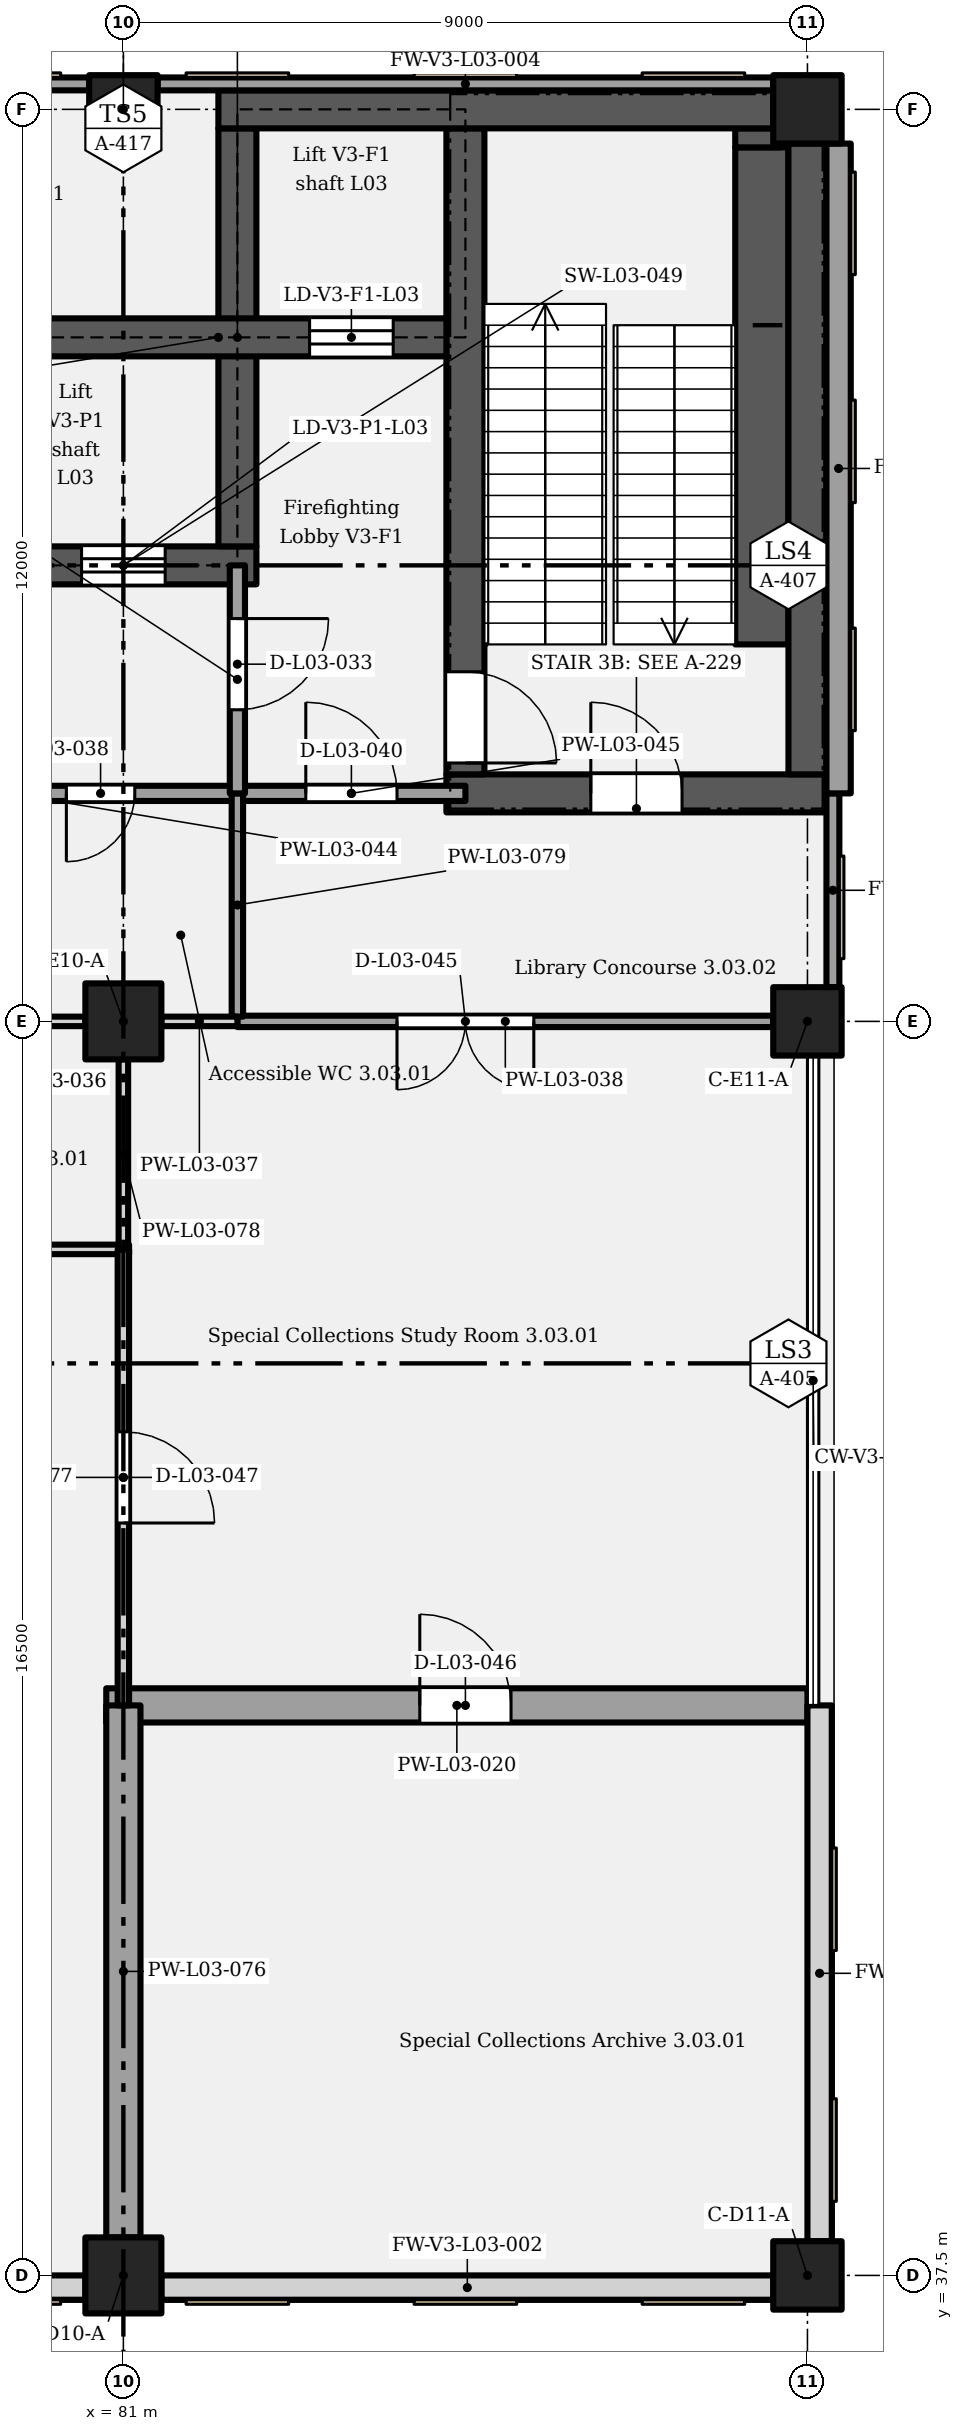
"""IFC4 building model, lengths in metres.
Left out: names, types, materials, properties, quantities, classifications, styles, units other than length and angle.
Written with IfcOpenShell. Run it as: python <this file> out.ifc"""

import sys

from ifc_helpers import new_model, si_unit, direction, frame, frame_2d, origin, origin_2d, place, context, subcontext, project, spatial, rectangle, extrude, element, fill, save


model = new_model("IFC4")
c1 = context("Model", 3, precision=1e-05, world=origin(), true_north=direction((0.0, 1.0)))
c2 = subcontext(c1, "Body", "Model", "MODEL_VIEW")
j1 = project(units=[si_unit("LENGTHUNIT", "METRE"), si_unit("PLANEANGLEUNIT", "RADIAN")], contexts=[c1])
p1 = place(None, origin())
s1 = spatial("IfcSite", under=j1, at=p1, CompositionType="ELEMENT")
p2 = place(p1, origin())
s2 = spatial("IfcBuilding", under=s1, at=p2, CompositionType="ELEMENT")
p3 = place(p2, frame((0.0, 0.0, 17.4)))
s3 = spatial("IfcBuildingStorey", under=s2, at=p3, CompositionType="ELEMENT", Elevation=17.4)
p4 = place(p3, frame((81.0, 37.5, 0.0), z_axis=(0.0, 0.0, 1.0), x_axis=(1.0, 0.0, 0.0)))
e1 = element("IfcColumn", 1, at=p4, inside=s3, PredefinedType="COLUMN", context=c2, shape_type="SweptSolid", body=[
    extrude(rectangle(XDim=1.0, YDim=1.0, at=origin_2d()), origin(), (0.0, 0.0, 1.0), 5.4),
])
p5 = place(p3, frame((90.0, 37.5, 0.0), z_axis=(0.0, 0.0, 1.0), x_axis=(1.0, 0.0, 0.0)))
e2 = element("IfcColumn", 2, at=p5, inside=s3, PredefinedType="COLUMN", context=c2, shape_type="SweptSolid", body=[
    extrude(rectangle(XDim=0.9, YDim=0.9, at=origin_2d()), origin(), (0.0, 0.0, 1.0), 5.4),
])
p6 = place(p3, frame((81.0, 54.0, 0.0), z_axis=(0.0, 0.0, 1.0), x_axis=(1.0, 0.0, 0.0)))
e3 = element("IfcColumn", 3, at=p6, inside=s3, PredefinedType="COLUMN", context=c2, shape_type="SweptSolid", body=[
    extrude(rectangle(XDim=1.0, YDim=1.0, at=origin_2d()), origin(), (0.0, 0.0, 1.0), 5.4),
])
for number, where, z_axis, x_axis in (
    (4, (90.0, 54.0, 0.0), (0.0, 0.0, 1.0), (1.0, 0.0, 0.0)),
    (5, (81.0, 66.0, 0.0), (0.0, 0.0, 1.0), (1.0, 0.0, 0.0)),
    (6, (90.0, 66.0, 0.0), (0.0, 0.0, 1.0), (1.0, 0.0, 0.0)),
):
    element("IfcColumn", number, at=place(p3, frame(where, z_axis=z_axis, x_axis=x_axis)), inside=s3, PredefinedType="COLUMN", context=c2, shape_type="SweptSolid", body=[
        extrude(rectangle(XDim=0.9, YDim=0.9, at=origin_2d()), origin(), (0.0, 0.0, 1.0), 5.4),
    ])
p7 = place(p3, frame((85.25, 57.0, 0.0), z_axis=(0.0, 0.0, 1.0), x_axis=(1.0, 0.0, 0.0)))
e7 = element("IfcWall", 7, at=p7, inside=s3, PredefinedType="SHEAR", context=c2, shape_type="SweptSolid", body=[
    extrude(rectangle(XDim=5.0, YDim=0.5, at=frame_2d((2.5, 0.0))), origin(), (0.0, 0.0, 1.0), 5.15),
])
p8 = place(p7, frame((1.9, 0.0, 0.0)))
e8 = element("IfcOpeningElement", 8, at=p8, cuts=e7, PredefinedType="OPENING", context=c2, shape_type="SweptSolid", body=[
    extrude(rectangle(XDim=1.2, YDim=2.1, at=frame_2d((0.6, 1.05))), frame((0.0, 0.26, 0.0), z_axis=(0.0, -1.0, 0.0), x_axis=(1.0, 0.0, 0.0)), (0.0, 0.0, 1.0), 0.52),
])
p9 = place(p3, frame((85.5, 57.25, 0.0), z_axis=(0.0, 0.0, 1.0), x_axis=(0.0, 1.0, 0.0)))
e9 = element("IfcWall", 9, at=p9, inside=s3, PredefinedType="SHEAR", context=c2, shape_type="SweptSolid", body=[
    extrude(rectangle(XDim=8.5, YDim=0.5, at=frame_2d((4.25, 0.0))), origin(), (0.0, 0.0, 1.0), 5.15),
])
p10 = place(p9, frame((1.35, 0.0, 0.0), z_axis=(0.0, 0.0, 1.0), x_axis=(-1.0, 0.0, 0.0)))
e10 = element("IfcOpeningElement", 10, at=p10, cuts=e9, PredefinedType="OPENING", context=c2, shape_type="SweptSolid", body=[
    extrude(rectangle(XDim=1.2, YDim=2.1, at=frame_2d((0.6, 1.05))), frame((0.0, 0.26, 0.0), z_axis=(0.0, -1.0, 0.0), x_axis=(1.0, 0.0, 0.0)), (0.0, 0.0, 1.0), 0.52),
])
p11 = place(p3, frame((90.0, 57.25, 0.0), z_axis=(0.0, 0.0, 1.0), x_axis=(0.0, 1.0, 0.0)))
e11 = element("IfcWall", 11, at=p11, inside=s3, PredefinedType="SHEAR", context=c2, shape_type="SweptSolid", body=[
    extrude(rectangle(XDim=8.3, YDim=0.5, at=frame_2d((4.15, 0.0))), origin(), (0.0, 0.0, 1.0), 5.15),
])
p12 = place(p3, frame((79.25, 60.0, 0.0), z_axis=(0.0, 0.0, 1.0), x_axis=(1.0, 0.0, 0.0)))
e12 = element("IfcWall", 12, at=p12, inside=s3, PredefinedType="SHEAR", context=c2, shape_type="SweptSolid", body=[
    extrude(rectangle(XDim=3.5, YDim=0.5, at=frame_2d((1.75, 0.0))), origin(), (0.0, 0.0, 1.0), 5.15),
])
p13 = place(p12, frame((1.2, 0.0, 0.0)))
e13 = element("IfcOpeningElement", 13, at=p13, cuts=e12, PredefinedType="OPENING", context=c2, shape_type="SweptSolid", body=[
    extrude(rectangle(XDim=1.1, YDim=2.1, at=frame_2d((0.55, 1.05))), frame((0.0, 0.26, 0.0), z_axis=(0.0, -1.0, 0.0), x_axis=(1.0, 0.0, 0.0)), (0.0, 0.0, 1.0), 0.52),
])
p14 = place(p3, frame((82.5, 60.25, 0.0), z_axis=(0.0, 0.0, 1.0), x_axis=(0.0, 1.0, 0.0)))
e14 = element("IfcWall", 14, at=p14, inside=s3, PredefinedType="SHEAR", context=c2, shape_type="SweptSolid", body=[
    extrude(rectangle(XDim=5.5, YDim=0.5, at=frame_2d((2.75, 0.0))), origin(), (0.0, 0.0, 1.0), 5.15),
])
p15 = place(p3, frame((79.25, 63.0, 0.0), z_axis=(0.0, 0.0, 1.0), x_axis=(1.0, 0.0, 0.0)))
e15 = element("IfcWall", 15, at=p15, inside=s3, PredefinedType="SHEAR", context=c2, shape_type="SweptSolid", body=[
    extrude(rectangle(XDim=6.0, YDim=0.5, at=frame_2d((3.0, 0.0))), origin(), (0.0, 0.0, 1.0), 5.15),
])
p16 = place(p15, frame((4.2, 0.0, 0.0)))
e16 = element("IfcOpeningElement", 16, at=p16, cuts=e15, PredefinedType="OPENING", context=c2, shape_type="SweptSolid", body=[
    extrude(rectangle(XDim=1.1, YDim=2.1, at=frame_2d((0.55, 1.05))), frame((0.0, 0.26, 0.0), z_axis=(0.0, -1.0, 0.0), x_axis=(1.0, 0.0, 0.0)), (0.0, 0.0, 1.0), 0.52),
])
p17 = place(p3, frame((82.25, 66.0, 0.0), z_axis=(0.0, 0.0, 1.0), x_axis=(1.0, 0.0, 0.0)))
e17 = element("IfcWall", 17, at=p17, inside=s3, PredefinedType="SHEAR", context=c2, shape_type="SweptSolid", body=[
    extrude(rectangle(XDim=7.3, YDim=0.5, at=frame_2d((3.65, 0.0))), origin(), (0.0, 0.0, 1.0), 5.15),
])
p18 = place(p3, frame((72.5, 37.34, 0.0), z_axis=(0.0, 0.0, 1.0), x_axis=(1.0, 0.0, 0.0)))
e18 = element("IfcWall", 18, at=p18, inside=s3, PredefinedType="SOLIDWALL", context=c2, shape_type="SweptSolid", body=[
    extrude(rectangle(XDim=8.0, YDim=0.32, at=frame_2d((4.0, 0.0))), origin(), (0.0, 0.0, 1.0), 5.15),
])
p19 = place(p3, frame((81.5, 37.34, 0.0), z_axis=(0.0, 0.0, 1.0), x_axis=(1.0, 0.0, 0.0)))
e19 = element("IfcWall", 19, at=p19, inside=s3, PredefinedType="SOLIDWALL", context=c2, shape_type="SweptSolid", body=[
    extrude(rectangle(XDim=8.05, YDim=0.32, at=frame_2d((4.025, 0.0))), origin(), (0.0, 0.0, 1.0), 5.15),
])
for number, where, z_axis, x_axis in (
    (20, (72.45, 66.335, 0.0), (0.0, 0.0, 1.0), (1.0, 0.0, 0.0)),
    (21, (81.45, 66.335, 0.0), (0.0, 0.0, 1.0), (1.0, 0.0, 0.0)),
):
    element("IfcWall", number, at=place(p3, frame(where, z_axis=z_axis, x_axis=x_axis)), inside=s3, PredefinedType="SOLIDWALL", context=c2, shape_type="SweptSolid", body=[
        extrude(rectangle(XDim=8.1, YDim=0.17, at=frame_2d((4.05, 0.0))), origin(), (0.0, 0.0, 1.0), 5.15),
    ])
p20 = place(p3, frame((90.16, 37.95, 0.0), z_axis=(0.0, 0.0, 1.0), x_axis=(0.0, 1.0, 0.0)))
e22 = element("IfcWall", 22, at=p20, inside=s3, PredefinedType="SOLIDWALL", context=c2, shape_type="SweptSolid", body=[
    extrude(rectangle(XDim=7.05, YDim=0.32, at=frame_2d((3.525, 0.0))), origin(), (0.0, 0.0, 1.0), 5.15),
])
p21 = place(p3, frame((90.335, 54.45, 0.0), z_axis=(0.0, 0.0, 1.0), x_axis=(0.0, 1.0, 0.0)))
e23 = element("IfcWall", 23, at=p21, inside=s3, PredefinedType="SOLIDWALL", context=c2, shape_type="SweptSolid", body=[
    extrude(rectangle(XDim=2.55, YDim=0.17, at=frame_2d((1.275, 0.0))), origin(), (0.0, 0.0, 1.0), 5.15),
])
p22 = place(p3, frame((90.41, 57.0, 0.0), z_axis=(0.0, 0.0, 1.0), x_axis=(0.0, 1.0, 0.0)))
e24 = element("IfcWall", 24, at=p22, inside=s3, PredefinedType="SOLIDWALL", context=c2, shape_type="SweptSolid", body=[
    extrude(rectangle(XDim=8.55, YDim=0.32, at=frame_2d((4.275, 0.0))), origin(), (0.0, 0.0, 1.0), 5.15),
])
p23 = place(p3, frame((80.775, 45.0, 0.0), z_axis=(0.0, 0.0, 1.0), x_axis=(1.0, 0.0, 0.0)))
e25 = element("IfcWall", 25, at=p23, inside=s3, PredefinedType="PARTITIONING", context=c2, shape_type="SweptSolid", body=[
    extrude(rectangle(XDim=9.225, YDim=0.45, at=frame_2d((4.613, 0.0))), origin(), (0.0, 0.0, 1.0), 5.15),
])
p24 = place(p23, frame((4.125, 0.0, 0.0)))
e26 = element("IfcOpeningElement", 26, at=p24, cuts=e25, PredefinedType="OPENING", context=c2, shape_type="SweptSolid", body=[
    extrude(rectangle(XDim=1.2, YDim=2.4, at=frame_2d((0.6, 1.2))), frame((0.0, 0.235, 0.0), z_axis=(0.0, -1.0, 0.0), x_axis=(1.0, 0.0, 0.0)), (0.0, 0.0, 1.0), 0.47),
])
p25 = place(p3, frame((72.0, 51.0, 0.0), z_axis=(0.0, 0.0, 1.0), x_axis=(1.0, 0.0, 0.0)))
e27 = element("IfcWall", 27, at=p25, inside=s3, PredefinedType="PARTITIONING", context=c2, shape_type="SweptSolid", body=[
    extrude(rectangle(XDim=9.075, YDim=0.125, at=frame_2d((4.538, 0.0))), origin(), (0.0, 0.0, 1.0), 5.15),
])
for number, where, z_axis, x_axis in (
    (28, (79.5, 54.0, 0.0), (0.0, 0.0, 1.0), (1.0, 0.0, 0.0)),
    (29, (81.5, 54.0, 0.0), (0.0, 0.0, 1.0), (1.0, 0.0, 0.0)),
):
    element("IfcWall", number, at=place(p3, frame(where, z_axis=z_axis, x_axis=x_axis)), inside=s3, PredefinedType="PARTITIONING", context=c2, shape_type="SweptSolid", body=[
        extrude(rectangle(XDim=1.0, YDim=0.125, at=frame_2d((0.5, 0.0))), origin(), (0.0, 0.0, 1.0), 4.4),
    ])
p26 = place(p3, frame((82.5, 54.0, 0.0), z_axis=(0.0, 0.0, 1.0), x_axis=(1.0, 0.0, 0.0)))
e30 = element("IfcWall", 30, at=p26, inside=s3, PredefinedType="PARTITIONING", context=c2, shape_type="SweptSolid", body=[
    extrude(rectangle(XDim=7.05, YDim=0.15, at=frame_2d((3.525, 0.0))), origin(), (0.0, 0.0, 1.0), 4.4),
])
p27 = place(p26, frame((3.9, 0.0, 0.0), z_axis=(0.0, 0.0, 1.0), x_axis=(-1.0, 0.0, 0.0)))
e31 = element("IfcOpeningElement", 31, at=p27, cuts=e30, PredefinedType="OPENING", context=c2, shape_type="SweptSolid", body=[
    extrude(rectangle(XDim=1.8, YDim=2.4, at=frame_2d((0.9, 1.2))), frame((0.0, 0.085, 0.0), z_axis=(0.0, -1.0, 0.0), x_axis=(1.0, 0.0, 0.0)), (0.0, 0.0, 1.0), 0.17),
])
p28 = place(p3, frame((76.5, 57.0, 0.0), z_axis=(0.0, 0.0, 1.0), x_axis=(1.0, 0.0, 0.0)))
e32 = element("IfcWall", 32, at=p28, inside=s3, PredefinedType="PARTITIONING", context=c2, shape_type="SweptSolid", body=[
    extrude(rectangle(XDim=6.0, YDim=0.2, at=frame_2d((3.0, 0.0))), origin(), (0.0, 0.0, 1.0), 5.15),
])
p29 = place(p28, frame((4.65, 0.0, 0.0), z_axis=(0.0, 0.0, 1.0), x_axis=(-1.0, 0.0, 0.0)))
e33 = element("IfcOpeningElement", 33, at=p29, cuts=e32, PredefinedType="OPENING", context=c2, shape_type="SweptSolid", body=[
    extrude(rectangle(XDim=0.9, YDim=2.1, at=frame_2d((0.45, 1.05))), frame((0.0, 0.11, 0.0), z_axis=(0.0, -1.0, 0.0), x_axis=(1.0, 0.0, 0.0)), (0.0, 0.0, 1.0), 0.22),
])
p30 = place(p28, frame((1.3, 0.0, 0.0)))
e34 = element("IfcOpeningElement", 34, at=p30, cuts=e32, PredefinedType="OPENING", context=c2, shape_type="SweptSolid", body=[
    extrude(rectangle(XDim=1.0, YDim=2.1, at=frame_2d((0.5, 1.05))), frame((0.0, 0.11, 0.0), z_axis=(0.0, -1.0, 0.0), x_axis=(1.0, 0.0, 0.0)), (0.0, 0.0, 1.0), 0.22),
])
p31 = place(p3, frame((82.5, 57.0, 0.0), z_axis=(0.0, 0.0, 1.0), x_axis=(1.0, 0.0, 0.0)))
e35 = element("IfcWall", 35, at=p31, inside=s3, PredefinedType="PARTITIONING", context=c2, shape_type="SweptSolid", body=[
    extrude(rectangle(XDim=3.0, YDim=0.2, at=frame_2d((1.5, 0.0))), origin(), (0.0, 0.0, 1.0), 5.15),
])
p32 = place(p31, frame((0.9, 0.0, 0.0)))
e36 = element("IfcOpeningElement", 36, at=p32, cuts=e35, PredefinedType="OPENING", context=c2, shape_type="SweptSolid", body=[
    extrude(rectangle(XDim=1.2, YDim=2.1, at=frame_2d((0.6, 1.05))), frame((0.0, 0.11, 0.0), z_axis=(0.0, -1.0, 0.0), x_axis=(1.0, 0.0, 0.0)), (0.0, 0.0, 1.0), 0.22),
])
p33 = place(p3, frame((81.0, 38.0, 0.0), z_axis=(0.0, 0.0, 1.0), x_axis=(0.0, 1.0, 0.0)))
e37 = element("IfcWall", 37, at=p33, inside=s3, PredefinedType="PARTITIONING", context=c2, shape_type="SweptSolid", body=[
    extrude(rectangle(XDim=7.0, YDim=0.45, at=frame_2d((3.5, 0.0))), origin(), (0.0, 0.0, 1.0), 4.2),
])
p34 = place(p3, frame((81.0, 45.0, 0.0), z_axis=(0.0, 0.0, 1.0), x_axis=(0.0, 1.0, 0.0)))
e38 = element("IfcWall", 38, at=p34, inside=s3, PredefinedType="PARTITIONING", context=c2, shape_type="SweptSolid", body=[
    extrude(rectangle(XDim=6.0, YDim=0.15, at=frame_2d((3.0, 0.0))), origin(), (0.0, 0.0, 1.0), 4.2),
])
p35 = place(p34, frame((3.6, 0.0, 0.0), z_axis=(0.0, 0.0, 1.0), x_axis=(-1.0, 0.0, 0.0)))
e39 = element("IfcOpeningElement", 39, at=p35, cuts=e38, PredefinedType="OPENING", context=c2, shape_type="SweptSolid", body=[
    extrude(rectangle(XDim=1.2, YDim=2.4, at=frame_2d((0.6, 1.2))), frame((0.0, 0.085, 0.0), z_axis=(0.0, -1.0, 0.0), x_axis=(1.0, 0.0, 0.0)), (0.0, 0.0, 1.0), 0.17),
])
p36 = place(p3, frame((81.0, 51.0, 0.0), z_axis=(0.0, 0.0, 1.0), x_axis=(0.0, 1.0, 0.0)))
e40 = element("IfcWall", 40, at=p36, inside=s3, PredefinedType="PARTITIONING", context=c2, shape_type="SweptSolid", body=[
    extrude(rectangle(XDim=2.5, YDim=0.125, at=frame_2d((1.25, 0.0))), origin(), (0.0, 0.0, 1.0), 4.2),
])
p37 = place(p3, frame((82.5, 54.062, 0.0), z_axis=(0.0, 0.0, 1.0), x_axis=(0.0, 1.0, 0.0)))
e41 = element("IfcWall", 41, at=p37, inside=s3, PredefinedType="PARTITIONING", context=c2, shape_type="SweptSolid", body=[
    extrude(rectangle(XDim=2.938, YDim=0.15, at=frame_2d((1.469, 0.0))), origin(), (0.0, 0.0, 1.0), 5.15),
])
p38 = place(p3, frame((82.5, 57.0, 0.0), z_axis=(0.0, 0.0, 1.0), x_axis=(0.0, 1.0, 0.0)))
e42 = element("IfcWall", 42, at=p38, inside=s3, PredefinedType="PARTITIONING", context=c2, shape_type="SweptSolid", body=[
    extrude(rectangle(XDim=3.0, YDim=0.2, at=frame_2d((1.5, 0.0))), origin(), (0.0, 0.0, 1.0), 5.15),
])
p39 = place(p38, frame((2.3, 0.0, 0.0), z_axis=(0.0, 0.0, 1.0), x_axis=(-1.0, 0.0, 0.0)))
e43 = element("IfcOpeningElement", 43, at=p39, cuts=e42, PredefinedType="OPENING", context=c2, shape_type="SweptSolid", body=[
    extrude(rectangle(XDim=1.2, YDim=2.1, at=frame_2d((0.6, 1.05))), frame((0.0, 0.11, 0.0), z_axis=(0.0, -1.0, 0.0), x_axis=(1.0, 0.0, 0.0)), (0.0, 0.0, 1.0), 0.22),
])
p40 = place(p3, frame((89.4, 58.96, 0.0), z_axis=(0.0, 0.0, 1.0), x_axis=(0.0, 1.0, 0.0)))
e44 = element("IfcWall", 44, at=p40, inside=s3, PredefinedType="SHEAR", context=c2, shape_type="SweptSolid", body=[
    extrude(rectangle(XDim=6.54, YDim=0.7, at=frame_2d((3.27, 0.0))), origin(), (0.0, 0.0, 1.0), 2.587),
])
p41 = place(p3, frame((89.35, 65.5, 0.0), z_axis=(0.0, 0.0, 1.0), x_axis=(0.0, 1.0, 0.0)))
e45 = element("IfcWall", 45, at=p41, inside=s3, PredefinedType="SHEAR", context=c2, shape_type="SweptSolid", body=[
    extrude(rectangle(XDim=0.25, YDim=0.6, at=frame_2d((0.125, 0.0))), origin(), (0.0, 0.0, 1.0), 2.587),
])
p42 = place(p39, origin())
e46 = element("IfcDoor", 46, at=p42, inside=s3, OperationType="SINGLE_SWING_LEFT", PredefinedType="DOOR", context=c2, shape_type="SweptSolid", body=[
    extrude(rectangle(XDim=1.2, YDim=2.1, at=frame_2d((0.6, 1.05))), frame((0.0, 0.025, 0.0), z_axis=(0.0, -1.0, 0.0), x_axis=(1.0, 0.0, 0.0)), (0.0, 0.0, 1.0), 0.05),
])
fill(e43, e46)
p43 = place(p13, origin())
e47 = element("IfcDoor", 47, at=p43, inside=s3, OperationType="SLIDING_TO_LEFT", PredefinedType="DOOR", context=c2, shape_type="SweptSolid", body=[
    extrude(rectangle(XDim=1.1, YDim=2.1, at=frame_2d((0.55, 1.05))), frame((0.0, 0.025, 0.0), z_axis=(0.0, -1.0, 0.0), x_axis=(1.0, 0.0, 0.0)), (0.0, 0.0, 1.0), 0.05),
])
fill(e13, e47)
p44 = place(p16, origin())
e48 = element("IfcDoor", 48, at=p44, inside=s3, OperationType="SLIDING_TO_LEFT", PredefinedType="DOOR", context=c2, shape_type="SweptSolid", body=[
    extrude(rectangle(XDim=1.1, YDim=2.1, at=frame_2d((0.55, 1.05))), frame((0.0, 0.025, 0.0), z_axis=(0.0, -1.0, 0.0), x_axis=(1.0, 0.0, 0.0)), (0.0, 0.0, 1.0), 0.05),
])
fill(e16, e48)
p45 = place(p10, origin())
e49 = element("IfcDoor", 49, at=p45, inside=s3, OperationType="SINGLE_SWING_RIGHT", PredefinedType="DOOR", context=c2, shape_type="SweptSolid", body=[
    extrude(rectangle(XDim=1.2, YDim=2.1, at=frame_2d((0.6, 1.05))), frame((0.0, 0.025, 0.0), z_axis=(0.0, -1.0, 0.0), x_axis=(1.0, 0.0, 0.0)), (0.0, 0.0, 1.0), 0.05),
])
fill(e10, e49)
p46 = place(p29, origin())
e50 = element("IfcDoor", 50, at=p46, inside=s3, OperationType="SINGLE_SWING_RIGHT", PredefinedType="DOOR", context=c2, shape_type="SweptSolid", body=[
    extrude(rectangle(XDim=0.9, YDim=2.1, at=frame_2d((0.45, 1.05))), frame((0.0, 0.025, 0.0), z_axis=(0.0, -1.0, 0.0), x_axis=(1.0, 0.0, 0.0)), (0.0, 0.0, 1.0), 0.05),
])
fill(e33, e50)
p47 = place(p32, origin())
e51 = element("IfcDoor", 51, at=p47, inside=s3, OperationType="SINGLE_SWING_LEFT", PredefinedType="DOOR", context=c2, shape_type="SweptSolid", body=[
    extrude(rectangle(XDim=1.2, YDim=2.1, at=frame_2d((0.6, 1.05))), frame((0.0, 0.025, 0.0), z_axis=(0.0, -1.0, 0.0), x_axis=(1.0, 0.0, 0.0)), (0.0, 0.0, 1.0), 0.05),
])
fill(e36, e51)
p48 = place(p8, origin())
e52 = element("IfcDoor", 52, at=p48, inside=s3, OperationType="SINGLE_SWING_LEFT", PredefinedType="DOOR", context=c2, shape_type="SweptSolid", body=[
    extrude(rectangle(XDim=1.2, YDim=2.1, at=frame_2d((0.6, 1.05))), frame((0.0, 0.025, 0.0), z_axis=(0.0, -1.0, 0.0), x_axis=(1.0, 0.0, 0.0)), (0.0, 0.0, 1.0), 0.05),
])
fill(e8, e52)
p49 = place(p27, origin())
e53 = element("IfcDoor", 53, at=p49, inside=s3, OperationType="DOUBLE_DOOR_SINGLE_SWING", PredefinedType="DOOR", context=c2, shape_type="SweptSolid", body=[
    extrude(rectangle(XDim=1.8, YDim=2.4, at=frame_2d((0.9, 1.2))), frame((0.0, 0.025, 0.0), z_axis=(0.0, -1.0, 0.0), x_axis=(1.0, 0.0, 0.0)), (0.0, 0.0, 1.0), 0.05),
])
fill(e31, e53)
p50 = place(p24, origin())
e54 = element("IfcDoor", 54, at=p50, inside=s3, OperationType="SINGLE_SWING_LEFT", PredefinedType="DOOR", context=c2, shape_type="SweptSolid", body=[
    extrude(rectangle(XDim=1.2, YDim=2.4, at=frame_2d((0.6, 1.2))), frame((0.0, 0.025, 0.0), z_axis=(0.0, -1.0, 0.0), x_axis=(1.0, 0.0, 0.0)), (0.0, 0.0, 1.0), 0.05),
])
fill(e26, e54)
p51 = place(p35, origin())
e55 = element("IfcDoor", 55, at=p51, inside=s3, OperationType="SINGLE_SWING_RIGHT", PredefinedType="DOOR", context=c2, shape_type="SweptSolid", body=[
    extrude(rectangle(XDim=1.2, YDim=2.4, at=frame_2d((0.6, 1.2))), frame((0.0, 0.025, 0.0), z_axis=(0.0, -1.0, 0.0), x_axis=(1.0, 0.0, 0.0)), (0.0, 0.0, 1.0), 0.05),
])
fill(e39, e55)
save(model, sys.argv[1])
